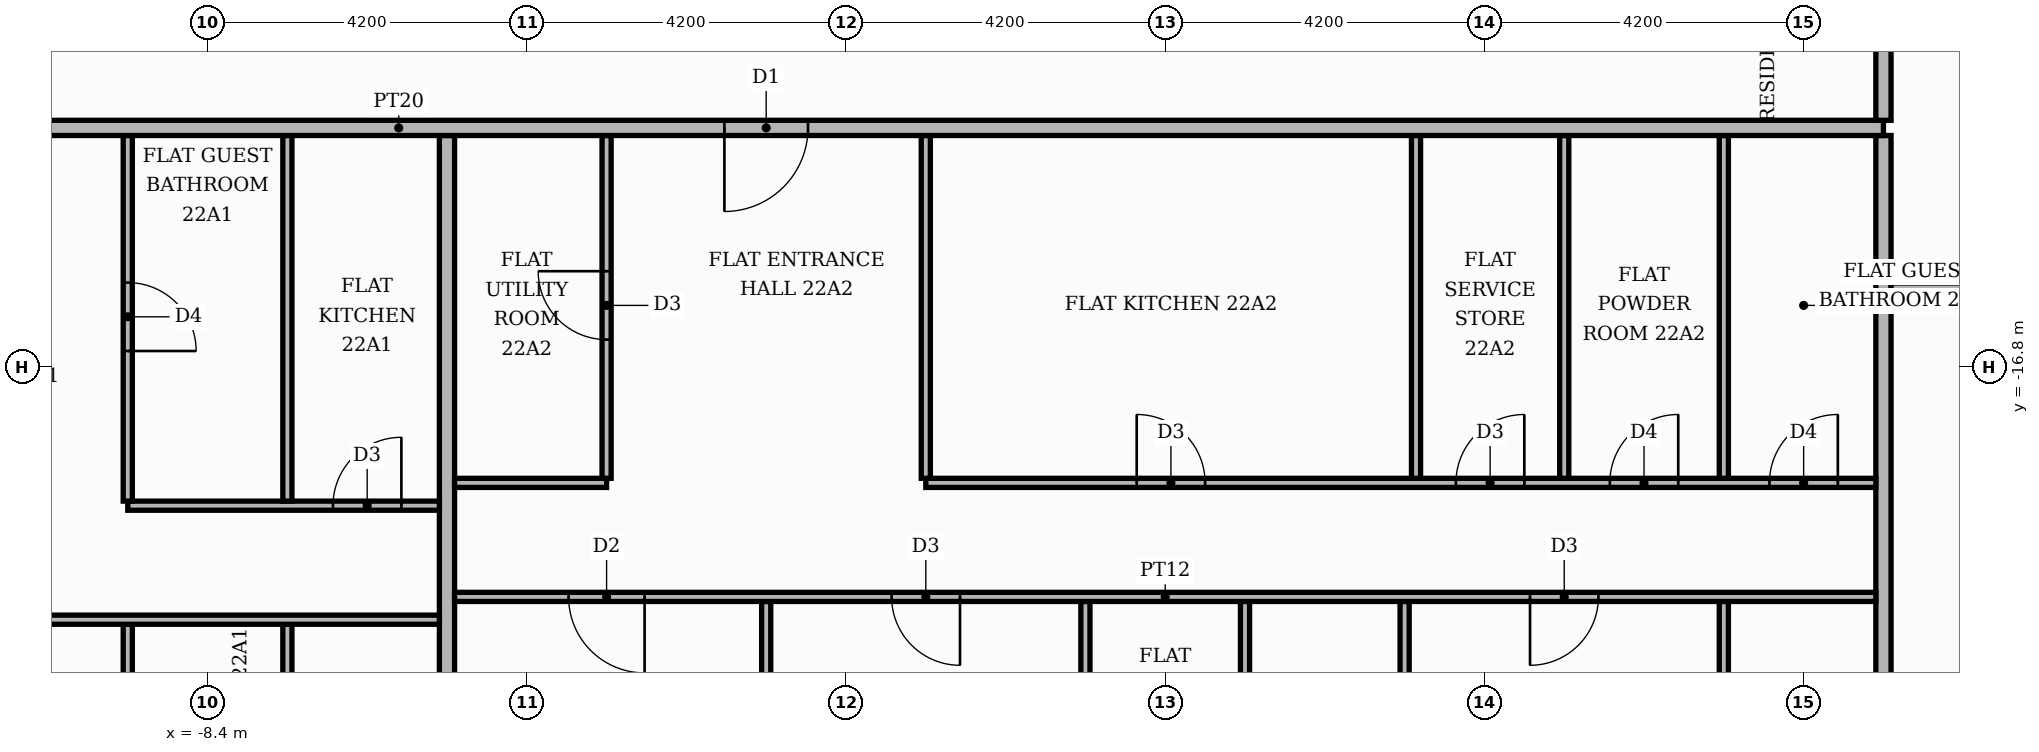
"""IFC4 building model, lengths in metres.
Left out: names, types, materials, properties, quantities, classifications, styles, units other than length and angle.
Written with IfcOpenShell. Run it as: python <this file> out.ifc"""

import sys

from ifc_helpers import new_model, si_unit, direction, frame, frame_2d, origin, place, context, subcontext, project, spatial, rectangle, extrude, element, fill, save


model = new_model("IFC4")
c1 = context("Model", 3, precision=1e-05, world=origin(), true_north=direction((0.0, 1.0)))
c2 = subcontext(c1, "Body", "Model", "MODEL_VIEW")
j1 = project(units=[si_unit("LENGTHUNIT", "METRE"), si_unit("PLANEANGLEUNIT", "RADIAN")], contexts=[c1])
p1 = place(None, origin())
s1 = spatial("IfcSite", under=j1, at=p1, CompositionType="ELEMENT")
p2 = place(p1, origin())
s2 = spatial("IfcBuilding", under=s1, at=p2, CompositionType="ELEMENT")
p3 = place(p2, frame((0.0, 0.0, 94.8)))
s3 = spatial("IfcBuildingStorey", under=s2, at=p3, CompositionType="ELEMENT", Elevation=94.8)
p4 = place(p3, frame((-9.45, -25.42, 0.0), z_axis=(0.0, 0.0, 1.0), x_axis=(0.0, 1.0, 0.0)))
e1 = element("IfcWall", 1, at=p4, inside=s3, PredefinedType="PARTITIONING", context=c2, shape_type="SweptSolid", body=[
    extrude(rectangle(XDim=5.24, YDim=0.12, at=frame_2d((2.62, 0.0))), origin(), (0.0, 0.0, 1.0), 3.48),
])
p5 = place(p4, frame((2.05, 0.0, 0.0)))
e2 = element("IfcOpeningElement", 2, at=p5, cuts=e1, PredefinedType="OPENING", context=c2, shape_type="SweptSolid", body=[
    extrude(rectangle(XDim=0.9, YDim=2.1, at=frame_2d((0.45, 1.05))), frame((0.0, 0.07, 0.0), z_axis=(0.0, -1.0, 0.0), x_axis=(1.0, 0.0, 0.0)), (0.0, 0.0, 1.0), 0.14),
])
p6 = place(p3, frame((-7.35, -25.42, 0.0), z_axis=(0.0, 0.0, 1.0), x_axis=(0.0, 1.0, 0.0)))
e3 = element("IfcWall", 3, at=p6, inside=s3, PredefinedType="PARTITIONING", context=c2, shape_type="SweptSolid", body=[
    extrude(rectangle(XDim=5.24, YDim=0.12, at=frame_2d((2.62, 0.0))), origin(), (0.0, 0.0, 1.0), 3.48),
])
p7 = place(p6, frame((2.05, 0.0, 0.0)))
e4 = element("IfcOpeningElement", 4, at=p7, cuts=e3, PredefinedType="OPENING", context=c2, shape_type="SweptSolid", body=[
    extrude(rectangle(XDim=0.9, YDim=2.1, at=frame_2d((0.45, 1.05))), frame((0.0, 0.07, 0.0), z_axis=(0.0, -1.0, 0.0), x_axis=(1.0, 0.0, 0.0)), (0.0, 0.0, 1.0), 0.14),
])
p8 = place(p3, frame((-5.25, -25.42, 0.0), z_axis=(0.0, 0.0, 1.0), x_axis=(0.0, 1.0, 0.0)))
e5 = element("IfcWall", 5, at=p8, inside=s3, PredefinedType="PARTITIONING", context=c2, shape_type="SweptSolid", body=[
    extrude(rectangle(XDim=11.67, YDim=0.2, at=frame_2d((5.835, 0.0))), origin(), (0.0, 0.0, 1.0), 3.48),
])
p9 = place(p3, frame((-1.05, -25.42, 0.0), z_axis=(0.0, 0.0, 1.0), x_axis=(0.0, 1.0, 0.0)))
e6 = element("IfcWall", 6, at=p9, inside=s3, PredefinedType="PARTITIONING", context=c2, shape_type="SweptSolid", body=[
    extrude(rectangle(XDim=5.54, YDim=0.12, at=frame_2d((2.77, 0.0))), origin(), (0.0, 0.0, 1.0), 3.48),
])
p10 = place(p3, frame((3.15, -25.42, 0.0), z_axis=(0.0, 0.0, 1.0), x_axis=(0.0, 1.0, 0.0)))
e7 = element("IfcWall", 7, at=p10, inside=s3, PredefinedType="PARTITIONING", context=c2, shape_type="SweptSolid", body=[
    extrude(rectangle(XDim=5.54, YDim=0.12, at=frame_2d((2.77, 0.0))), origin(), (0.0, 0.0, 1.0), 3.48),
])
p11 = place(p10, frame((2.2, 0.0, 0.0)))
e8 = element("IfcOpeningElement", 8, at=p11, cuts=e7, PredefinedType="OPENING", context=c2, shape_type="SweptSolid", body=[
    extrude(rectangle(XDim=0.9, YDim=2.1, at=frame_2d((0.45, 1.05))), frame((0.0, 0.07, 0.0), z_axis=(0.0, -1.0, 0.0), x_axis=(1.0, 0.0, 0.0)), (0.0, 0.0, 1.0), 0.14),
])
p12 = place(p3, frame((5.25, -25.42, 0.0), z_axis=(0.0, 0.0, 1.0), x_axis=(0.0, 1.0, 0.0)))
e9 = element("IfcWall", 9, at=p12, inside=s3, PredefinedType="PARTITIONING", context=c2, shape_type="SweptSolid", body=[
    extrude(rectangle(XDim=5.54, YDim=0.12, at=frame_2d((2.77, 0.0))), origin(), (0.0, 0.0, 1.0), 3.48),
])
p13 = place(p12, frame((2.2, 0.0, 0.0)))
e10 = element("IfcOpeningElement", 10, at=p13, cuts=e9, PredefinedType="OPENING", context=c2, shape_type="SweptSolid", body=[
    extrude(rectangle(XDim=0.9, YDim=2.1, at=frame_2d((0.45, 1.05))), frame((0.0, 0.07, 0.0), z_axis=(0.0, -1.0, 0.0), x_axis=(1.0, 0.0, 0.0)), (0.0, 0.0, 1.0), 0.14),
])
p14 = place(p3, frame((7.35, -25.42, 0.0), z_axis=(0.0, 0.0, 1.0), x_axis=(0.0, 1.0, 0.0)))
e11 = element("IfcWall", 11, at=p14, inside=s3, PredefinedType="PARTITIONING", context=c2, shape_type="SweptSolid", body=[
    extrude(rectangle(XDim=5.54, YDim=0.12, at=frame_2d((2.77, 0.0))), origin(), (0.0, 0.0, 1.0), 3.48),
])
p15 = place(p3, frame((11.55, -25.42, 0.0), z_axis=(0.0, 0.0, 1.0), x_axis=(0.0, 1.0, 0.0)))
e12 = element("IfcWall", 12, at=p15, inside=s3, PredefinedType="PARTITIONING", context=c2, shape_type="SweptSolid", body=[
    extrude(rectangle(XDim=5.54, YDim=0.12, at=frame_2d((2.77, 0.0))), origin(), (0.0, 0.0, 1.0), 3.48),
])
p16 = place(p15, frame((2.2, 0.0, 0.0)))
e13 = element("IfcOpeningElement", 13, at=p16, cuts=e12, PredefinedType="OPENING", context=c2, shape_type="SweptSolid", body=[
    extrude(rectangle(XDim=0.9, YDim=2.1, at=frame_2d((0.45, 1.05))), frame((0.0, 0.07, 0.0), z_axis=(0.0, -1.0, 0.0), x_axis=(1.0, 0.0, 0.0)), (0.0, 0.0, 1.0), 0.14),
])
p17 = place(p3, frame((13.65, -25.42, 0.0), z_axis=(0.0, 0.0, 1.0), x_axis=(0.0, 1.0, 0.0)))
e14 = element("IfcWall", 14, at=p17, inside=s3, PredefinedType="PARTITIONING", context=c2, shape_type="SweptSolid", body=[
    extrude(rectangle(XDim=11.67, YDim=0.2, at=frame_2d((5.835, 0.0))), origin(), (0.0, 0.0, 1.0), 3.48),
])
p18 = place(p3, frame((-17.4, -20.12, 0.0), z_axis=(0.0, 0.0, 1.0), x_axis=(1.0, 0.0, 0.0)))
e15 = element("IfcWall", 15, at=p18, inside=s3, PredefinedType="PARTITIONING", context=c2, shape_type="SweptSolid", body=[
    extrude(rectangle(XDim=12.05, YDim=0.12, at=frame_2d((6.025, 0.0))), origin(), (0.0, 0.0, 1.0), 3.48),
])
p19 = place(p18, frame((2.2, 0.0, 0.0)))
e16 = element("IfcOpeningElement", 16, at=p19, cuts=e15, PredefinedType="OPENING", context=c2, shape_type="SweptSolid", body=[
    extrude(rectangle(XDim=1.0, YDim=2.1, at=frame_2d((0.5, 1.05))), frame((0.0, 0.07, 0.0), z_axis=(0.0, -1.0, 0.0), x_axis=(1.0, 0.0, 0.0)), (0.0, 0.0, 1.0), 0.14),
])
p20 = place(p18, frame((5.4, 0.0, 0.0)))
e17 = element("IfcOpeningElement", 17, at=p20, cuts=e15, PredefinedType="OPENING", context=c2, shape_type="SweptSolid", body=[
    extrude(rectangle(XDim=0.9, YDim=2.1, at=frame_2d((0.45, 1.05))), frame((0.0, 0.07, 0.0), z_axis=(0.0, -1.0, 0.0), x_axis=(1.0, 0.0, 0.0)), (0.0, 0.0, 1.0), 0.14),
])
p21 = place(p3, frame((-5.15, -19.82, 0.0), z_axis=(0.0, 0.0, 1.0), x_axis=(1.0, 0.0, 0.0)))
e18 = element("IfcWall", 18, at=p21, inside=s3, PredefinedType="PARTITIONING", context=c2, shape_type="SweptSolid", body=[
    extrude(rectangle(XDim=18.7, YDim=0.12, at=frame_2d((9.35, 0.0))), origin(), (0.0, 0.0, 1.0), 3.48),
])
p22 = place(p21, frame((1.5, 0.0, 0.0)))
e19 = element("IfcOpeningElement", 19, at=p22, cuts=e18, PredefinedType="OPENING", context=c2, shape_type="SweptSolid", body=[
    extrude(rectangle(XDim=1.0, YDim=2.1, at=frame_2d((0.5, 1.05))), frame((0.0, 0.07, 0.0), z_axis=(0.0, -1.0, 0.0), x_axis=(1.0, 0.0, 0.0)), (0.0, 0.0, 1.0), 0.14),
])
p23 = place(p21, frame((5.75, 0.0, 0.0)))
e20 = element("IfcOpeningElement", 20, at=p23, cuts=e18, PredefinedType="OPENING", context=c2, shape_type="SweptSolid", body=[
    extrude(rectangle(XDim=0.9, YDim=2.1, at=frame_2d((0.45, 1.05))), frame((0.0, 0.07, 0.0), z_axis=(0.0, -1.0, 0.0), x_axis=(1.0, 0.0, 0.0)), (0.0, 0.0, 1.0), 0.14),
])
p24 = place(p21, frame((14.15, 0.0, 0.0)))
e21 = element("IfcOpeningElement", 21, at=p24, cuts=e18, PredefinedType="OPENING", context=c2, shape_type="SweptSolid", body=[
    extrude(rectangle(XDim=0.9, YDim=2.1, at=frame_2d((0.45, 1.05))), frame((0.0, 0.07, 0.0), z_axis=(0.0, -1.0, 0.0), x_axis=(1.0, 0.0, 0.0)), (0.0, 0.0, 1.0), 0.14),
])
p25 = place(p3, frame((-9.45, -18.62, 0.0), z_axis=(0.0, 0.0, 1.0), x_axis=(1.0, 0.0, 0.0)))
e22 = element("IfcWall", 22, at=p25, inside=s3, PredefinedType="PARTITIONING", context=c2, shape_type="SweptSolid", body=[
    extrude(rectangle(XDim=4.1, YDim=0.12, at=frame_2d((2.05, 0.0))), origin(), (0.0, 0.0, 1.0), 3.48),
])
p26 = place(p25, frame((2.7, 0.0, 0.0)))
e23 = element("IfcOpeningElement", 23, at=p26, cuts=e22, PredefinedType="OPENING", context=c2, shape_type="SweptSolid", body=[
    extrude(rectangle(XDim=0.9, YDim=2.1, at=frame_2d((0.45, 1.05))), frame((0.0, 0.07, 0.0), z_axis=(0.0, -1.0, 0.0), x_axis=(1.0, 0.0, 0.0)), (0.0, 0.0, 1.0), 0.14),
])
p27 = place(p3, frame((-9.45, -18.56, 0.0), z_axis=(0.0, 0.0, 1.0), x_axis=(0.0, 1.0, 0.0)))
e24 = element("IfcWall", 24, at=p27, inside=s3, PredefinedType="PARTITIONING", context=c2, shape_type="SweptSolid", body=[
    extrude(rectangle(XDim=4.81, YDim=0.12, at=frame_2d((2.405, 0.0))), origin(), (0.0, 0.0, 1.0), 3.48),
])
p28 = place(p27, frame((1.975, 0.0, 0.0)))
e25 = element("IfcOpeningElement", 25, at=p28, cuts=e24, PredefinedType="OPENING", context=c2, shape_type="SweptSolid", body=[
    extrude(rectangle(XDim=0.9, YDim=2.1, at=frame_2d((0.45, 1.05))), frame((0.0, 0.07, 0.0), z_axis=(0.0, -1.0, 0.0), x_axis=(1.0, 0.0, 0.0)), (0.0, 0.0, 1.0), 0.14),
])
p29 = place(p3, frame((-7.35, -18.56, 0.0), z_axis=(0.0, 0.0, 1.0), x_axis=(0.0, 1.0, 0.0)))
e26 = element("IfcWall", 26, at=p29, inside=s3, PredefinedType="PARTITIONING", context=c2, shape_type="SweptSolid", body=[
    extrude(rectangle(XDim=4.81, YDim=0.12, at=frame_2d((2.405, 0.0))), origin(), (0.0, 0.0, 1.0), 3.48),
])
p30 = place(p3, frame((-5.15, -18.32, 0.0), z_axis=(0.0, 0.0, 1.0), x_axis=(1.0, 0.0, 0.0)))
e27 = element("IfcWall", 27, at=p30, inside=s3, PredefinedType="PARTITIONING", context=c2, shape_type="SweptSolid", body=[
    extrude(rectangle(XDim=2.0, YDim=0.12, at=frame_2d((1.0, 0.0))), origin(), (0.0, 0.0, 1.0), 3.48),
])
p31 = place(p3, frame((1.05, -18.32, 0.0), z_axis=(0.0, 0.0, 1.0), x_axis=(1.0, 0.0, 0.0)))
e28 = element("IfcWall", 28, at=p31, inside=s3, PredefinedType="PARTITIONING", context=c2, shape_type="SweptSolid", body=[
    extrude(rectangle(XDim=12.5, YDim=0.12, at=frame_2d((6.25, 0.0))), origin(), (0.0, 0.0, 1.0), 3.48),
])
p32 = place(p31, frame((2.775, 0.0, 0.0)))
e29 = element("IfcOpeningElement", 29, at=p32, cuts=e28, PredefinedType="OPENING", context=c2, shape_type="SweptSolid", body=[
    extrude(rectangle(XDim=0.9, YDim=2.1, at=frame_2d((0.45, 1.05))), frame((0.0, 0.07, 0.0), z_axis=(0.0, -1.0, 0.0), x_axis=(1.0, 0.0, 0.0)), (0.0, 0.0, 1.0), 0.14),
])
p33 = place(p31, frame((6.975, 0.0, 0.0)))
e30 = element("IfcOpeningElement", 30, at=p33, cuts=e28, PredefinedType="OPENING", context=c2, shape_type="SweptSolid", body=[
    extrude(rectangle(XDim=0.9, YDim=2.1, at=frame_2d((0.45, 1.05))), frame((0.0, 0.07, 0.0), z_axis=(0.0, -1.0, 0.0), x_axis=(1.0, 0.0, 0.0)), (0.0, 0.0, 1.0), 0.14),
])
p34 = place(p31, frame((9.0, 0.0, 0.0)))
e31 = element("IfcOpeningElement", 31, at=p34, cuts=e28, PredefinedType="OPENING", context=c2, shape_type="SweptSolid", body=[
    extrude(rectangle(XDim=0.9, YDim=2.1, at=frame_2d((0.45, 1.05))), frame((0.0, 0.07, 0.0), z_axis=(0.0, -1.0, 0.0), x_axis=(1.0, 0.0, 0.0)), (0.0, 0.0, 1.0), 0.14),
])
p35 = place(p31, frame((11.1, 0.0, 0.0)))
e32 = element("IfcOpeningElement", 32, at=p35, cuts=e28, PredefinedType="OPENING", context=c2, shape_type="SweptSolid", body=[
    extrude(rectangle(XDim=0.9, YDim=2.1, at=frame_2d((0.45, 1.05))), frame((0.0, 0.07, 0.0), z_axis=(0.0, -1.0, 0.0), x_axis=(1.0, 0.0, 0.0)), (0.0, 0.0, 1.0), 0.14),
])
p36 = place(p3, frame((-3.15, -18.26, 0.0), z_axis=(0.0, 0.0, 1.0), x_axis=(0.0, 1.0, 0.0)))
e33 = element("IfcWall", 33, at=p36, inside=s3, PredefinedType="PARTITIONING", context=c2, shape_type="SweptSolid", body=[
    extrude(rectangle(XDim=4.51, YDim=0.12, at=frame_2d((2.255, 0.0))), origin(), (0.0, 0.0, 1.0), 3.48),
])
p37 = place(p36, frame((1.825, 0.0, 0.0)))
e34 = element("IfcOpeningElement", 34, at=p37, cuts=e33, PredefinedType="OPENING", context=c2, shape_type="SweptSolid", body=[
    extrude(rectangle(XDim=0.9, YDim=2.1, at=frame_2d((0.45, 1.05))), frame((0.0, 0.07, 0.0), z_axis=(0.0, -1.0, 0.0), x_axis=(1.0, 0.0, 0.0)), (0.0, 0.0, 1.0), 0.14),
])
for number, where, z_axis, x_axis in (
    (35, (1.05, -18.26, 0.0), (0.0, 0.0, 1.0), (0.0, 1.0, 0.0)),
    (36, (7.5, -18.26, 0.0), (0.0, 0.0, 1.0), (0.0, 1.0, 0.0)),
    (37, (9.45, -18.26, 0.0), (0.0, 0.0, 1.0), (0.0, 1.0, 0.0)),
    (38, (11.55, -18.26, 0.0), (0.0, 0.0, 1.0), (0.0, 1.0, 0.0)),
):
    element("IfcWall", number, at=place(p3, frame(where, z_axis=z_axis, x_axis=x_axis)), inside=s3, PredefinedType="PARTITIONING", context=c2, shape_type="SweptSolid", body=[
        extrude(rectangle(XDim=4.51, YDim=0.12, at=frame_2d((2.255, 0.0))), origin(), (0.0, 0.0, 1.0), 3.48),
    ])
p38 = place(p3, frame((13.75, -15.75, 0.0), z_axis=(0.0, 0.0, 1.0), x_axis=(1.0, 0.0, 0.0)))
e39 = element("IfcWall", 39, at=p38, inside=s3, PredefinedType="PARTITIONING", context=c2, shape_type="SweptSolid", body=[
    extrude(rectangle(XDim=6.37, YDim=0.12, at=frame_2d((3.185, 0.0))), origin(), (0.0, 0.0, 1.0), 3.48),
])
p39 = place(p38, frame((2.635, 0.0, 0.0)))
e40 = element("IfcOpeningElement", 40, at=p39, cuts=e39, PredefinedType="OPENING", context=c2, shape_type="SweptSolid", body=[
    extrude(rectangle(XDim=1.0, YDim=2.1, at=frame_2d((0.5, 1.05))), frame((0.0, 0.07, 0.0), z_axis=(0.0, -1.0, 0.0), x_axis=(1.0, 0.0, 0.0)), (0.0, 0.0, 1.0), 0.14),
])
p40 = place(p3, frame((-25.42, -13.65, 0.0), z_axis=(0.0, 0.0, 1.0), x_axis=(1.0, 0.0, 0.0)))
e41 = element("IfcWall", 41, at=p40, inside=s3, PredefinedType="PARTITIONING", context=c2, shape_type="SweptSolid", body=[
    extrude(rectangle(XDim=39.07, YDim=0.2, at=frame_2d((19.535, 0.0))), origin(), (0.0, 0.0, 1.0), 3.48),
])
p41 = place(p40, frame((13.32, 0.0, 0.0)))
e42 = element("IfcOpeningElement", 42, at=p41, cuts=e41, PredefinedType="OPENING", context=c2, shape_type="SweptSolid", body=[
    extrude(rectangle(XDim=1.1, YDim=2.4, at=frame_2d((0.55, 1.2))), frame((0.0, 0.11, 0.0), z_axis=(0.0, -1.0, 0.0), x_axis=(1.0, 0.0, 0.0)), (0.0, 0.0, 1.0), 0.22),
])
p42 = place(p40, frame((23.82, 0.0, 0.0)))
e43 = element("IfcOpeningElement", 43, at=p42, cuts=e41, PredefinedType="OPENING", context=c2, shape_type="SweptSolid", body=[
    extrude(rectangle(XDim=1.1, YDim=2.4, at=frame_2d((0.55, 1.2))), frame((0.0, 0.11, 0.0), z_axis=(0.0, -1.0, 0.0), x_axis=(1.0, 0.0, 0.0)), (0.0, 0.0, 1.0), 0.22),
])
p43 = place(p3, frame((13.65, -13.55, 0.0), z_axis=(0.0, 0.0, 1.0), x_axis=(0.0, 1.0, 0.0)))
e44 = element("IfcWall", 44, at=p43, inside=s3, PredefinedType="PARTITIONING", context=c2, shape_type="SweptSolid", body=[
    extrude(rectangle(XDim=8.2, YDim=0.2, at=frame_2d((4.1, 0.0))), origin(), (0.0, 0.0, 1.0), 3.48),
])
p44 = place(p43, frame((1.45, 0.0, 0.0)))
e45 = element("IfcOpeningElement", 45, at=p44, cuts=e44, PredefinedType="OPENING", context=c2, shape_type="SweptSolid", body=[
    extrude(rectangle(XDim=1.1, YDim=2.4, at=frame_2d((0.55, 1.2))), frame((0.0, 0.11, 0.0), z_axis=(0.0, -1.0, 0.0), x_axis=(1.0, 0.0, 0.0)), (0.0, 0.0, 1.0), 0.22),
])
p45 = place(p28, frame((0.9, 0.0, 0.0), z_axis=(0.0, 0.0, 1.0), x_axis=(-1.0, 0.0, 0.0)))
e46 = element("IfcDoor", 46, at=p45, inside=s3, OperationType="SINGLE_SWING_LEFT", PredefinedType="DOOR", context=c2, shape_type="SweptSolid", body=[
    extrude(rectangle(XDim=0.9, YDim=2.1, at=frame_2d((0.45, 1.05))), frame((0.0, 0.025, 0.0), z_axis=(0.0, -1.0, 0.0), x_axis=(1.0, 0.0, 0.0)), (0.0, 0.0, 1.0), 0.05),
])
fill(e25, e46)
p46 = place(p26, origin())
e47 = element("IfcDoor", 47, at=p46, inside=s3, OperationType="SINGLE_SWING_RIGHT", PredefinedType="DOOR", context=c2, shape_type="SweptSolid", body=[
    extrude(rectangle(XDim=0.9, YDim=2.1, at=frame_2d((0.45, 1.05))), frame((0.0, 0.025, 0.0), z_axis=(0.0, -1.0, 0.0), x_axis=(1.0, 0.0, 0.0)), (0.0, 0.0, 1.0), 0.05),
])
fill(e23, e47)
p47 = place(p42, frame((1.1, 0.0, 0.0), z_axis=(0.0, 0.0, 1.0), x_axis=(-1.0, 0.0, 0.0)))
e48 = element("IfcDoor", 48, at=p47, inside=s3, OperationType="SINGLE_SWING_LEFT", PredefinedType="DOOR", context=c2, shape_type="SweptSolid", body=[
    extrude(rectangle(XDim=1.1, YDim=2.4, at=frame_2d((0.55, 1.2))), frame((0.0, 0.025, 0.0), z_axis=(0.0, -1.0, 0.0), x_axis=(1.0, 0.0, 0.0)), (0.0, 0.0, 1.0), 0.05),
])
fill(e43, e48)
p48 = place(p37, origin())
e49 = element("IfcDoor", 49, at=p48, inside=s3, OperationType="SINGLE_SWING_RIGHT", PredefinedType="DOOR", context=c2, shape_type="SweptSolid", body=[
    extrude(rectangle(XDim=0.9, YDim=2.1, at=frame_2d((0.45, 1.05))), frame((0.0, 0.025, 0.0), z_axis=(0.0, -1.0, 0.0), x_axis=(1.0, 0.0, 0.0)), (0.0, 0.0, 1.0), 0.05),
])
fill(e34, e49)
p49 = place(p32, origin())
e50 = element("IfcDoor", 50, at=p49, inside=s3, OperationType="SINGLE_SWING_LEFT", PredefinedType="DOOR", context=c2, shape_type="SweptSolid", body=[
    extrude(rectangle(XDim=0.9, YDim=2.1, at=frame_2d((0.45, 1.05))), frame((0.0, 0.025, 0.0), z_axis=(0.0, -1.0, 0.0), x_axis=(1.0, 0.0, 0.0)), (0.0, 0.0, 1.0), 0.05),
])
fill(e29, e50)
p50 = place(p33, origin())
e51 = element("IfcDoor", 51, at=p50, inside=s3, OperationType="SINGLE_SWING_RIGHT", PredefinedType="DOOR", context=c2, shape_type="SweptSolid", body=[
    extrude(rectangle(XDim=0.9, YDim=2.1, at=frame_2d((0.45, 1.05))), frame((0.0, 0.025, 0.0), z_axis=(0.0, -1.0, 0.0), x_axis=(1.0, 0.0, 0.0)), (0.0, 0.0, 1.0), 0.05),
])
fill(e30, e51)
p51 = place(p34, origin())
e52 = element("IfcDoor", 52, at=p51, inside=s3, OperationType="SINGLE_SWING_RIGHT", PredefinedType="DOOR", context=c2, shape_type="SweptSolid", body=[
    extrude(rectangle(XDim=0.9, YDim=2.1, at=frame_2d((0.45, 1.05))), frame((0.0, 0.025, 0.0), z_axis=(0.0, -1.0, 0.0), x_axis=(1.0, 0.0, 0.0)), (0.0, 0.0, 1.0), 0.05),
])
fill(e31, e52)
p52 = place(p35, origin())
e53 = element("IfcDoor", 53, at=p52, inside=s3, OperationType="SINGLE_SWING_RIGHT", PredefinedType="DOOR", context=c2, shape_type="SweptSolid", body=[
    extrude(rectangle(XDim=0.9, YDim=2.1, at=frame_2d((0.45, 1.05))), frame((0.0, 0.025, 0.0), z_axis=(0.0, -1.0, 0.0), x_axis=(1.0, 0.0, 0.0)), (0.0, 0.0, 1.0), 0.05),
])
fill(e32, e53)
p53 = place(p22, frame((1.0, 0.0, 0.0), z_axis=(0.0, 0.0, 1.0), x_axis=(-1.0, 0.0, 0.0)))
e54 = element("IfcDoor", 54, at=p53, inside=s3, OperationType="SINGLE_SWING_RIGHT", PredefinedType="DOOR", context=c2, shape_type="SweptSolid", body=[
    extrude(rectangle(XDim=1.0, YDim=2.1, at=frame_2d((0.5, 1.05))), frame((0.0, 0.025, 0.0), z_axis=(0.0, -1.0, 0.0), x_axis=(1.0, 0.0, 0.0)), (0.0, 0.0, 1.0), 0.05),
])
fill(e19, e54)
p54 = place(p23, frame((0.9, 0.0, 0.0), z_axis=(0.0, 0.0, 1.0), x_axis=(-1.0, 0.0, 0.0)))
e55 = element("IfcDoor", 55, at=p54, inside=s3, OperationType="SINGLE_SWING_RIGHT", PredefinedType="DOOR", context=c2, shape_type="SweptSolid", body=[
    extrude(rectangle(XDim=0.9, YDim=2.1, at=frame_2d((0.45, 1.05))), frame((0.0, 0.025, 0.0), z_axis=(0.0, -1.0, 0.0), x_axis=(1.0, 0.0, 0.0)), (0.0, 0.0, 1.0), 0.05),
])
fill(e20, e55)
p55 = place(p24, frame((0.9, 0.0, 0.0), z_axis=(0.0, 0.0, 1.0), x_axis=(-1.0, 0.0, 0.0)))
e56 = element("IfcDoor", 56, at=p55, inside=s3, OperationType="SINGLE_SWING_LEFT", PredefinedType="DOOR", context=c2, shape_type="SweptSolid", body=[
    extrude(rectangle(XDim=0.9, YDim=2.1, at=frame_2d((0.45, 1.05))), frame((0.0, 0.025, 0.0), z_axis=(0.0, -1.0, 0.0), x_axis=(1.0, 0.0, 0.0)), (0.0, 0.0, 1.0), 0.05),
])
fill(e21, e56)
save(model, sys.argv[1])
